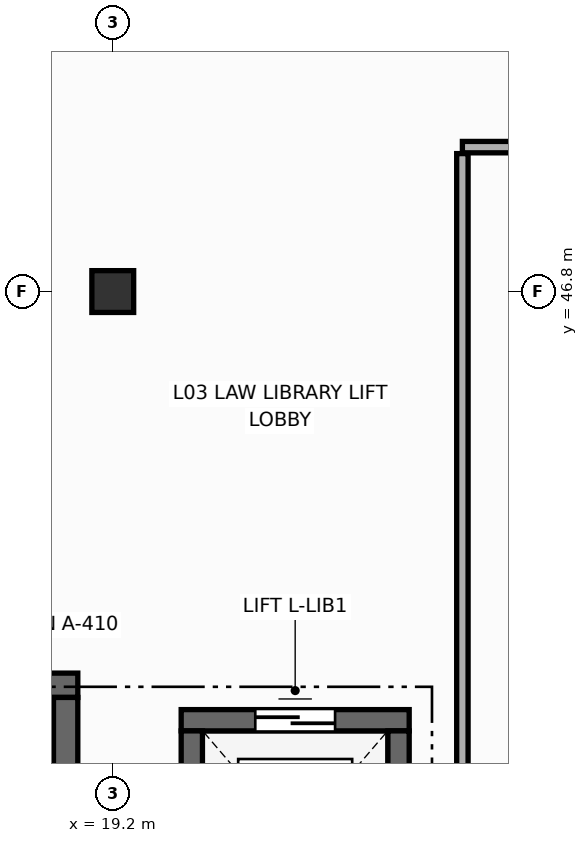
"""IFC4 building model, lengths in metres.
Left out: names, types, materials, properties, quantities, classifications, styles, units other than length and angle.
Written with IfcOpenShell. Run it as: python <this file> out.ifc"""

import sys

from ifc_helpers import new_model, si_unit, direction, frame, frame_2d, origin, origin_2d, place, context, subcontext, project, spatial, rectangle, extrude, element, fill, save


model = new_model("IFC4")
c1 = context("Model", 3, precision=1e-05, world=origin(), true_north=direction((0.0, 1.0)))
c2 = subcontext(c1, "Body", "Model", "MODEL_VIEW")
j1 = project(units=[si_unit("LENGTHUNIT", "METRE"), si_unit("PLANEANGLEUNIT", "RADIAN")], contexts=[c1])
p1 = place(None, origin())
s1 = spatial("IfcSite", under=j1, at=p1, CompositionType="ELEMENT")
p2 = place(p1, origin())
s2 = spatial("IfcBuilding", under=s1, at=p2, CompositionType="ELEMENT")
p3 = place(p2, frame((0.0, 0.0, 9.9)))
s3 = spatial("IfcBuildingStorey", under=s2, at=p3, CompositionType="ELEMENT", Elevation=9.9)
p4 = place(p3, frame((19.2, 46.8, 0.0), z_axis=(0.0, 0.0, 1.0), x_axis=(1.0, 0.0, 0.0)))
e1 = element("IfcColumn", 1, at=p4, inside=s3, PredefinedType="COLUMN", context=c2, shape_type="SweptSolid", body=[
    extrude(rectangle(XDim=0.55, YDim=0.55, at=origin_2d()), origin(), (0.0, 0.0, 1.0), 4.5),
])
p5 = place(p3, frame((9.86, 41.62, 0.0), z_axis=(0.0, 0.0, 1.0), x_axis=(1.0, 0.0, 0.0)))
e2 = element("IfcWall", 2, at=p5, inside=s3, PredefinedType="SHEAR", context=c2, shape_type="SweptSolid", body=[
    extrude(rectangle(XDim=8.88, YDim=0.32, at=frame_2d((4.44, 0.0))), origin(), (0.0, 0.0, 1.0), 4.25),
])
p6 = place(p3, frame((18.58, 41.46, 0.0), z_axis=(0.0, 0.0, 1.0), x_axis=(0.0, -1.0, 0.0)))
e3 = element("IfcWall", 3, at=p6, inside=s3, PredefinedType="SHEAR", context=c2, shape_type="SweptSolid", body=[
    extrude(rectangle(XDim=3.28, YDim=0.32, at=frame_2d((1.64, 0.0))), origin(), (0.0, 0.0, 1.0), 4.25),
])
p7 = place(p3, frame((20.1, 41.16, 0.0), z_axis=(0.0, 0.0, 1.0), x_axis=(1.0, 0.0, 0.0)))
e4 = element("IfcWall", 4, at=p7, inside=s3, PredefinedType="SHEAR", context=c2, shape_type="SweptSolid", body=[
    extrude(rectangle(XDim=3.0, YDim=0.28, at=frame_2d((1.5, 0.0))), origin(), (0.0, 0.0, 1.0), 4.25),
])
p8 = place(p7, frame((0.975, 0.0, 0.0)))
e5 = element("IfcOpeningElement", 5, at=p8, cuts=e4, PredefinedType="OPENING", context=c2, shape_type="SweptSolid", body=[
    extrude(rectangle(XDim=1.05, YDim=2.2, at=frame_2d((0.525, 1.1))), frame((0.0, 0.15, 0.0), z_axis=(0.0, -1.0, 0.0), x_axis=(1.0, 0.0, 0.0)), (0.0, 0.0, 1.0), 0.3),
])
for number, where, z_axis, x_axis in (
    (6, (20.24, 38.18, 0.0), (0.0, 0.0, 1.0), (0.0, 1.0, 0.0)),
    (7, (22.96, 41.02, 0.0), (0.0, 0.0, 1.0), (0.0, -1.0, 0.0)),
):
    element("IfcWall", number, at=place(p3, frame(where, z_axis=z_axis, x_axis=x_axis)), inside=s3, PredefinedType="SHEAR", context=c2, shape_type="SweptSolid", body=[
        extrude(rectangle(XDim=2.84, YDim=0.28, at=frame_2d((1.42, 0.0))), origin(), (0.0, 0.0, 1.0), 4.25),
    ])
p9 = place(p3, frame((23.8, 48.7, 0.0), z_axis=(0.0, 0.0, 1.0), x_axis=(1.0, 0.0, 0.0)))
e8 = element("IfcWall", 8, at=p9, inside=s3, PredefinedType="PARTITIONING", context=c2, shape_type="SweptSolid", body=[
    extrude(rectangle(XDim=14.0, YDim=0.15, at=frame_2d((7.0, 0.0))), origin(), (0.0, 0.0, 1.0), 3.38),
])
p10 = place(p9, frame((7.43, 0.0, 0.0)))
e9 = element("IfcOpeningElement", 9, at=p10, cuts=e8, PredefinedType="OPENING", context=c2, shape_type="SweptSolid", body=[
    extrude(rectangle(XDim=1.5, YDim=2.35, at=frame_2d((0.75, 1.175))), frame((0.0, 0.085, 0.0), z_axis=(0.0, -1.0, 0.0), x_axis=(1.0, 0.0, 0.0)), (0.0, 0.0, 1.0), 0.17),
])
p11 = place(p3, frame((23.8, 37.885, 0.0), z_axis=(0.0, 0.0, 1.0), x_axis=(0.0, 1.0, 0.0)))
e10 = element("IfcWall", 10, at=p11, inside=s3, PredefinedType="PARTITIONING", context=c2, shape_type="SweptSolid", body=[
    extrude(rectangle(XDim=10.73, YDim=0.15, at=frame_2d((5.365, 0.0))), origin(), (0.0, 0.0, 1.0), 3.53),
])
p12 = place(p8, origin())
e11 = element("IfcDoor", 11, at=p12, inside=s3, OperationType="DOUBLE_DOOR_SLIDING", PredefinedType="DOOR", context=c2, shape_type="SweptSolid", body=[
    extrude(rectangle(XDim=1.05, YDim=2.2, at=frame_2d((0.525, 1.1))), frame((0.0, 0.025, 0.0), z_axis=(0.0, -1.0, 0.0), x_axis=(1.0, 0.0, 0.0)), (0.0, 0.0, 1.0), 0.05),
])
fill(e5, e11)
save(model, sys.argv[1])
